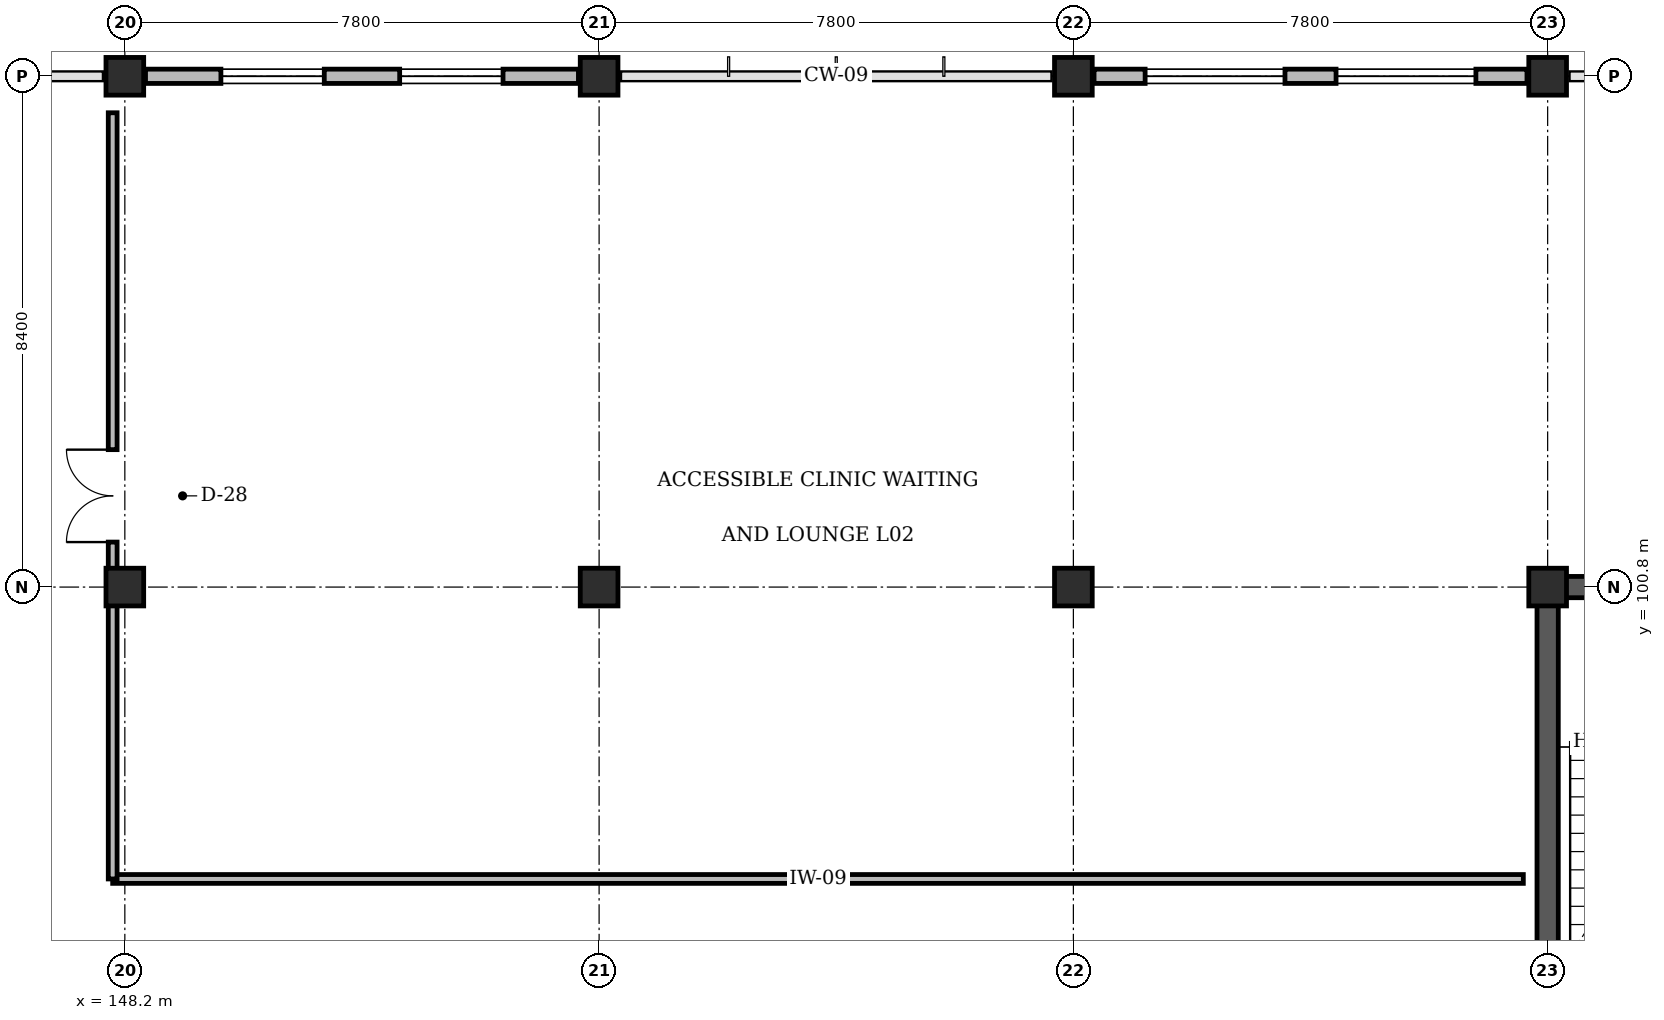
"""IFC4 building model, lengths in metres.
Left out: names, types, materials, properties, quantities, classifications, styles, units other than length and angle.
Written with IfcOpenShell. Run it as: python <this file> out.ifc"""

import sys

from ifc_helpers import new_model, si_unit, direction, frame, frame_2d, origin, origin_2d, place, context, subcontext, project, spatial, rectangle, extrude, element, fill, save


model = new_model("IFC4")
c1 = context("Model", 3, precision=1e-05, world=origin(), true_north=direction((0.0, 1.0)))
c2 = subcontext(c1, "Body", "Model", "MODEL_VIEW")
j1 = project(units=[si_unit("LENGTHUNIT", "METRE"), si_unit("PLANEANGLEUNIT", "RADIAN")], contexts=[c1])
p1 = place(None, origin())
s1 = spatial("IfcSite", under=j1, at=p1, CompositionType="ELEMENT")
p2 = place(p1, origin())
s2 = spatial("IfcBuilding", under=s1, at=p2, CompositionType="ELEMENT")
p3 = place(p2, frame((0.0, 0.0, 9.6)))
s3 = spatial("IfcBuildingStorey", under=s2, at=p3, CompositionType="ELEMENT", Elevation=9.6)
p4 = place(p3, frame((171.425, 100.8, 0.0), z_axis=(0.0, 0.0, 1.0), x_axis=(1.0, 0.0, 0.0)))
e1 = element("IfcWall", 1, at=p4, inside=s3, PredefinedType="SHEAR", context=c2, shape_type="SweptSolid", body=[
    extrude(rectangle(XDim=8.15, YDim=0.35, at=frame_2d((4.075, 0.0))), origin(), (0.0, 0.0, 1.0), 4.48),
])
p5 = place(p3, frame((171.6, 92.4, 0.0), z_axis=(0.0, 0.0, 1.0), x_axis=(0.0, 1.0, 0.0)))
e2 = element("IfcWall", 2, at=p5, inside=s3, PredefinedType="SHEAR", context=c2, shape_type="SweptSolid", body=[
    extrude(rectangle(XDim=8.4, YDim=0.35, at=frame_2d((4.2, 0.0))), origin(), (0.0, 0.0, 1.0), 4.48),
])
for number, where, z_axis, x_axis in (
    (3, (148.2, 100.8, 0.0), (0.0, 0.0, 1.0), (1.0, 0.0, 0.0)),
    (4, (148.2, 109.2, 0.0), (0.0, 0.0, 1.0), (1.0, 0.0, 0.0)),
    (5, (156.0, 100.8, 0.0), (0.0, 0.0, 1.0), (1.0, 0.0, 0.0)),
    (6, (156.0, 109.2, 0.0), (0.0, 0.0, 1.0), (1.0, 0.0, 0.0)),
    (7, (163.8, 100.8, 0.0), (0.0, 0.0, 1.0), (1.0, 0.0, 0.0)),
    (8, (163.8, 109.2, 0.0), (0.0, 0.0, 1.0), (1.0, 0.0, 0.0)),
    (9, (171.6, 100.8, 0.0), (0.0, 0.0, 1.0), (1.0, 0.0, 0.0)),
    (10, (171.6, 109.2, 0.0), (0.0, 0.0, 1.0), (1.0, 0.0, 0.0)),
):
    element("IfcColumn", number, at=place(p3, frame(where, z_axis=z_axis, x_axis=x_axis)), inside=s3, PredefinedType="COLUMN", context=c2, shape_type="SweptSolid", body=[
        extrude(rectangle(XDim=0.62, YDim=0.62, at=origin_2d()), origin(), (0.0, 0.0, 1.0), 4.8),
    ])
p6 = place(p3, frame((148.54, 109.2, 0.0), z_axis=(0.0, 0.0, 1.0), x_axis=(1.0, 0.0, 0.0)))
e11 = element("IfcWall", 11, at=p6, inside=s3, PredefinedType="STANDARD", context=c2, shape_type="SweptSolid", body=[
    extrude(rectangle(XDim=7.12, YDim=0.235, at=frame_2d((3.56, 0.0))), origin(), (0.0, 0.0, 1.0), 3.73),
])
p7 = place(p6, frame((1.24, 0.0, 0.9)))
e12 = element("IfcOpeningElement", 12, at=p7, cuts=e11, PredefinedType="OPENING", context=c2, shape_type="SweptSolid", body=[
    extrude(rectangle(XDim=1.7, YDim=1.6, at=frame_2d((0.85, 0.8))), frame((0.0, 0.127, 0.0), z_axis=(0.0, -1.0, 0.0), x_axis=(1.0, 0.0, 0.0)), (0.0, 0.0, 1.0), 0.255),
])
p8 = place(p6, frame((4.18, 0.0, 0.9)))
e13 = element("IfcOpeningElement", 13, at=p8, cuts=e11, PredefinedType="OPENING", context=c2, shape_type="SweptSolid", body=[
    extrude(rectangle(XDim=1.7, YDim=1.6, at=frame_2d((0.85, 0.8))), frame((0.0, 0.127, 0.0), z_axis=(0.0, -1.0, 0.0), x_axis=(1.0, 0.0, 0.0)), (0.0, 0.0, 1.0), 0.255),
])
p9 = place(p3, frame((164.14, 109.2, 0.0), z_axis=(0.0, 0.0, 1.0), x_axis=(1.0, 0.0, 0.0)))
e14 = element("IfcWall", 14, at=p9, inside=s3, PredefinedType="STANDARD", context=c2, shape_type="SweptSolid", body=[
    extrude(rectangle(XDim=7.12, YDim=0.235, at=frame_2d((3.56, 0.0))), origin(), (0.0, 0.0, 1.0), 3.73),
])
p10 = place(p9, frame((0.84, 0.0, 0.9)))
e15 = element("IfcOpeningElement", 15, at=p10, cuts=e14, PredefinedType="OPENING", context=c2, shape_type="SweptSolid", body=[
    extrude(rectangle(XDim=2.3, YDim=1.6, at=frame_2d((1.15, 0.8))), frame((0.0, 0.127, 0.0), z_axis=(0.0, -1.0, 0.0), x_axis=(1.0, 0.0, 0.0)), (0.0, 0.0, 1.0), 0.255),
])
p11 = place(p9, frame((3.98, 0.0, 0.9)))
e16 = element("IfcOpeningElement", 16, at=p11, cuts=e14, PredefinedType="OPENING", context=c2, shape_type="SweptSolid", body=[
    extrude(rectangle(XDim=2.3, YDim=1.6, at=frame_2d((1.15, 0.8))), frame((0.0, 0.127, 0.0), z_axis=(0.0, -1.0, 0.0), x_axis=(1.0, 0.0, 0.0)), (0.0, 0.0, 1.0), 0.255),
])
p12 = place(p3, frame((148.0, 96.0, 0.0), z_axis=(0.0, 0.0, 1.0), x_axis=(1.0, 0.0, 0.0)))
e17 = element("IfcWall", 17, at=p12, inside=s3, PredefinedType="PARTITIONING", context=c2, shape_type="SweptSolid", body=[
    extrude(rectangle(XDim=23.2, YDim=0.145, at=frame_2d((11.6, 0.0))), origin(), (0.0, 0.0, 1.0), 4.46),
])
p13 = place(p3, frame((148.0, 96.0, 0.0), z_axis=(0.0, 0.0, 1.0), x_axis=(0.0, 1.0, 0.0)))
e18 = element("IfcWall", 18, at=p13, inside=s3, PredefinedType="PARTITIONING", context=c2, shape_type="SweptSolid", body=[
    extrude(rectangle(XDim=12.6, YDim=0.145, at=frame_2d((6.3, 0.0))), origin(), (0.0, 0.0, 1.0), 3.715),
])
p14 = place(p13, frame((5.54, 0.0, 0.0)))
e19 = element("IfcOpeningElement", 19, at=p14, cuts=e18, PredefinedType="OPENING", context=c2, shape_type="SweptSolid", body=[
    extrude(rectangle(XDim=1.52, YDim=2.2, at=frame_2d((0.76, 1.1))), frame((0.0, 0.083, 0.0), z_axis=(0.0, -1.0, 0.0), x_axis=(1.0, 0.0, 0.0)), (0.0, 0.0, 1.0), 0.165),
])
p15 = place(p7, origin())
e20 = element("IfcWindow", 20, at=p15, inside=s3, PartitioningType="SINGLE_PANEL", PredefinedType="WINDOW", context=c2, shape_type="SweptSolid", body=[
    extrude(rectangle(XDim=1.7, YDim=1.6, at=frame_2d((0.85, 0.8))), frame((0.0, 0.03, 0.0), z_axis=(0.0, -1.0, 0.0), x_axis=(1.0, 0.0, 0.0)), (0.0, 0.0, 1.0), 0.06),
])
fill(e12, e20)
p16 = place(p8, origin())
e21 = element("IfcWindow", 21, at=p16, inside=s3, PartitioningType="SINGLE_PANEL", PredefinedType="WINDOW", context=c2, shape_type="SweptSolid", body=[
    extrude(rectangle(XDim=1.7, YDim=1.6, at=frame_2d((0.85, 0.8))), frame((0.0, 0.03, 0.0), z_axis=(0.0, -1.0, 0.0), x_axis=(1.0, 0.0, 0.0)), (0.0, 0.0, 1.0), 0.06),
])
fill(e13, e21)
p17 = place(p10, origin())
e22 = element("IfcWindow", 22, at=p17, inside=s3, PartitioningType="SINGLE_PANEL", PredefinedType="WINDOW", context=c2, shape_type="SweptSolid", body=[
    extrude(rectangle(XDim=2.3, YDim=1.6, at=frame_2d((1.15, 0.8))), frame((0.0, 0.03, 0.0), z_axis=(0.0, -1.0, 0.0), x_axis=(1.0, 0.0, 0.0)), (0.0, 0.0, 1.0), 0.06),
])
fill(e15, e22)
p18 = place(p11, origin())
e23 = element("IfcWindow", 23, at=p18, inside=s3, PartitioningType="SINGLE_PANEL", PredefinedType="WINDOW", context=c2, shape_type="SweptSolid", body=[
    extrude(rectangle(XDim=2.3, YDim=1.6, at=frame_2d((1.15, 0.8))), frame((0.0, 0.03, 0.0), z_axis=(0.0, -1.0, 0.0), x_axis=(1.0, 0.0, 0.0)), (0.0, 0.0, 1.0), 0.06),
])
fill(e16, e23)
p19 = place(p14, origin())
e24 = element("IfcDoor", 24, at=p19, inside=s3, OperationType="DOUBLE_DOOR_SINGLE_SWING", PredefinedType="DOOR", context=c2, shape_type="SweptSolid", body=[
    extrude(rectangle(XDim=1.52, YDim=2.2, at=frame_2d((0.76, 1.1))), frame((0.0, 0.025, 0.0), z_axis=(0.0, -1.0, 0.0), x_axis=(1.0, 0.0, 0.0)), (0.0, 0.0, 1.0), 0.05),
])
fill(e19, e24)
save(model, sys.argv[1])
